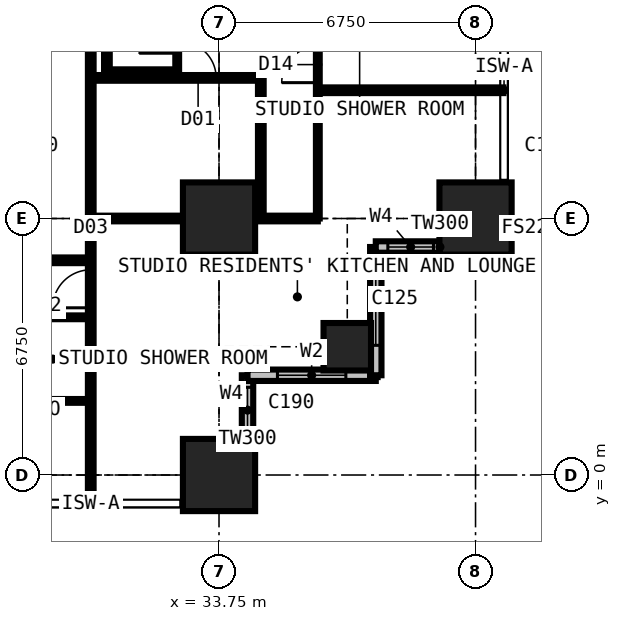
"""IFC4 building model, lengths in metres.
Left out: names, types, materials, properties, quantities, classifications, styles, units other than length and angle.
Written with IfcOpenShell. Run it as: python <this file> out.ifc"""

import sys

from ifc_helpers import new_model, si_unit, direction, frame, frame_2d, origin, origin_2d, place, context, subcontext, project, spatial, rectangle, extrude, element, fill, save


model = new_model("IFC4")
c1 = context("Model", 3, precision=1e-05, world=origin(), true_north=direction((0.0, 1.0)))
c2 = subcontext(c1, "Body", "Model", "MODEL_VIEW")
j1 = project(units=[si_unit("LENGTHUNIT", "METRE"), si_unit("PLANEANGLEUNIT", "RADIAN")], contexts=[c1])
p1 = place(None, origin())
s1 = spatial("IfcSite", under=j1, at=p1, CompositionType="ELEMENT")
p2 = place(p1, origin())
s2 = spatial("IfcBuilding", under=s1, at=p2, CompositionType="ELEMENT")
p3 = place(p2, frame((0.0, 0.0, 36.0)))
s3 = spatial("IfcBuildingStorey", under=s2, at=p3, CompositionType="ELEMENT", Elevation=36.0)
for number, where, z_axis, x_axis in (
    (1, (33.75, 0.0, 0.0), (0.0, 0.0, 1.0), (1.0, 0.0, 0.0)),
    (2, (33.75, 6.75, 0.0), (0.0, 0.0, 1.0), (1.0, 0.0, 0.0)),
):
    element("IfcColumn", number, at=place(p3, frame(where, z_axis=z_axis, x_axis=x_axis)), inside=s3, PredefinedType="COLUMN", context=c2, shape_type="SweptSolid", body=[
        extrude(rectangle(XDim=1.9, YDim=1.9, at=origin_2d()), origin(), (0.0, 0.0, 1.0), 3.6),
    ])
p4 = place(p3, frame((37.125, 3.375, 0.0), z_axis=(0.0, 0.0, 1.0), x_axis=(1.0, 0.0, 0.0)))
e3 = element("IfcColumn", 3, at=p4, inside=s3, PredefinedType="COLUMN", context=c2, shape_type="SweptSolid", body=[
    extrude(rectangle(XDim=1.25, YDim=1.25, at=origin_2d()), origin(), (0.0, 0.0, 1.0), 3.6),
])
p5 = place(p3, frame((40.5, 6.75, 0.0), z_axis=(0.0, 0.0, 1.0), x_axis=(1.0, 0.0, 0.0)))
e4 = element("IfcColumn", 4, at=p5, inside=s3, PredefinedType="COLUMN", context=c2, shape_type="SweptSolid", body=[
    extrude(rectangle(XDim=1.9, YDim=1.9, at=origin_2d()), origin(), (0.0, 0.0, 1.0), 3.6),
])
p6 = place(p3, frame((34.5, -0.75, 0.0), z_axis=(0.0, 0.0, 1.0), x_axis=(0.0, 1.0, 0.0)))
e5 = element("IfcWall", 5, at=p6, inside=s3, PredefinedType="SOLIDWALL", context=c2, shape_type="SweptSolid", body=[
    extrude(rectangle(XDim=3.375, YDim=0.3, at=frame_2d((1.688, 0.0))), origin(), (0.0, 0.0, 1.0), 3.375),
])
p7 = place(p6, frame((1.857, 0.0, 0.9)))
e6 = element("IfcOpeningElement", 6, at=p7, cuts=e5, PredefinedType="OPENING", context=c2, shape_type="SweptSolid", body=[
    extrude(rectangle(XDim=1.2, YDim=1.8, at=frame_2d((0.6, 0.9))), frame((0.0, 0.16, 0.0), z_axis=(0.0, -1.0, 0.0), x_axis=(1.0, 0.0, 0.0)), (0.0, 0.0, 1.0), 0.32),
])
p8 = place(p3, frame((34.5, 2.625, 0.0), z_axis=(0.0, 0.0, 1.0), x_axis=(1.0, 0.0, 0.0)))
e7 = element("IfcWall", 7, at=p8, inside=s3, PredefinedType="SOLIDWALL", context=c2, shape_type="SweptSolid", body=[
    extrude(rectangle(XDim=3.375, YDim=0.3, at=frame_2d((1.688, 0.0))), origin(), (0.0, 0.0, 1.0), 3.375),
])
p9 = place(p8, frame((0.788, 0.0, 0.6)))
e8 = element("IfcOpeningElement", 8, at=p9, cuts=e7, PredefinedType="OPENING", context=c2, shape_type="SweptSolid", body=[
    extrude(rectangle(XDim=1.8, YDim=2.1, at=frame_2d((0.9, 1.05))), frame((0.0, 0.16, 0.0), z_axis=(0.0, -1.0, 0.0), x_axis=(1.0, 0.0, 0.0)), (0.0, 0.0, 1.0), 0.32),
])
p10 = place(p3, frame((37.875, 2.625, 0.0), z_axis=(0.0, 0.0, 1.0), x_axis=(0.0, 1.0, 0.0)))
e9 = element("IfcWall", 9, at=p10, inside=s3, PredefinedType="SOLIDWALL", context=c2, shape_type="SweptSolid", body=[
    extrude(rectangle(XDim=3.375, YDim=0.3, at=frame_2d((1.688, 0.0))), origin(), (0.0, 0.0, 1.0), 3.375),
])
p11 = place(p10, frame((0.788, 0.0, 0.6)))
e10 = element("IfcOpeningElement", 10, at=p11, cuts=e9, PredefinedType="OPENING", context=c2, shape_type="SweptSolid", body=[
    extrude(rectangle(XDim=1.8, YDim=2.1, at=frame_2d((0.9, 1.05))), frame((0.0, 0.16, 0.0), z_axis=(0.0, -1.0, 0.0), x_axis=(1.0, 0.0, 0.0)), (0.0, 0.0, 1.0), 0.32),
])
p12 = place(p3, frame((37.875, 6.0, 0.0), z_axis=(0.0, 0.0, 1.0), x_axis=(1.0, 0.0, 0.0)))
e11 = element("IfcWall", 11, at=p12, inside=s3, PredefinedType="SOLIDWALL", context=c2, shape_type="SweptSolid", body=[
    extrude(rectangle(XDim=3.375, YDim=0.3, at=frame_2d((1.688, 0.0))), origin(), (0.0, 0.0, 1.0), 3.375),
])
p13 = place(p12, frame((0.317, 0.0, 0.9)))
e12 = element("IfcOpeningElement", 12, at=p13, cuts=e11, PredefinedType="OPENING", context=c2, shape_type="SweptSolid", body=[
    extrude(rectangle(XDim=1.2, YDim=1.8, at=frame_2d((0.6, 0.9))), frame((0.0, 0.16, 0.0), z_axis=(0.0, -1.0, 0.0), x_axis=(1.0, 0.0, 0.0)), (0.0, 0.0, 1.0), 0.32),
])
p14 = place(p3, frame((6.75, 4.15, 0.0), z_axis=(0.0, 0.0, 1.0), x_axis=(1.0, 0.0, 0.0)))
e13 = element("IfcWall", 13, at=p14, inside=s3, PredefinedType="PARTITIONING", context=c2, shape_type="SweptSolid", body=[
    extrude(rectangle(XDim=23.625, YDim=0.1, at=frame_2d((11.812, 0.0))), origin(), (0.0, 0.0, 1.0), 3.375),
])
p15 = place(p14, frame((0.2, 0.0, 0.0)))
e14 = element("IfcOpeningElement", 14, at=p15, cuts=e13, PredefinedType="OPENING", context=c2, shape_type="SweptSolid", body=[
    extrude(rectangle(XDim=0.95, YDim=2.2, at=frame_2d((0.475, 1.1))), frame((0.0, 0.06, 0.0), z_axis=(0.0, -1.0, 0.0), x_axis=(1.0, 0.0, 0.0)), (0.0, 0.0, 1.0), 0.12),
])
p16 = place(p14, frame((3.625, 0.0, 0.0)))
e15 = element("IfcOpeningElement", 15, at=p16, cuts=e13, PredefinedType="OPENING", context=c2, shape_type="SweptSolid", body=[
    extrude(rectangle(XDim=0.95, YDim=2.2, at=frame_2d((0.475, 1.1))), frame((0.0, 0.06, 0.0), z_axis=(0.0, -1.0, 0.0), x_axis=(1.0, 0.0, 0.0)), (0.0, 0.0, 1.0), 0.12),
])
p17 = place(p14, frame((7.0, 0.0, 0.0)))
e16 = element("IfcOpeningElement", 16, at=p17, cuts=e13, PredefinedType="OPENING", context=c2, shape_type="SweptSolid", body=[
    extrude(rectangle(XDim=0.95, YDim=2.2, at=frame_2d((0.475, 1.1))), frame((0.0, 0.06, 0.0), z_axis=(0.0, -1.0, 0.0), x_axis=(1.0, 0.0, 0.0)), (0.0, 0.0, 1.0), 0.12),
])
p18 = place(p14, frame((10.325, 0.0, 0.0)))
e17 = element("IfcOpeningElement", 17, at=p18, cuts=e13, PredefinedType="OPENING", context=c2, shape_type="SweptSolid", body=[
    extrude(rectangle(XDim=0.95, YDim=2.2, at=frame_2d((0.475, 1.1))), frame((0.0, 0.06, 0.0), z_axis=(0.0, -1.0, 0.0), x_axis=(1.0, 0.0, 0.0)), (0.0, 0.0, 1.0), 0.12),
])
p19 = place(p14, frame((13.75, 0.0, 0.0)))
e18 = element("IfcOpeningElement", 18, at=p19, cuts=e13, PredefinedType="OPENING", context=c2, shape_type="SweptSolid", body=[
    extrude(rectangle(XDim=0.95, YDim=2.2, at=frame_2d((0.475, 1.1))), frame((0.0, 0.06, 0.0), z_axis=(0.0, -1.0, 0.0), x_axis=(1.0, 0.0, 0.0)), (0.0, 0.0, 1.0), 0.12),
])
p20 = place(p14, frame((17.125, 0.0, 0.0)))
e19 = element("IfcOpeningElement", 19, at=p20, cuts=e13, PredefinedType="OPENING", context=c2, shape_type="SweptSolid", body=[
    extrude(rectangle(XDim=0.95, YDim=2.2, at=frame_2d((0.475, 1.1))), frame((0.0, 0.06, 0.0), z_axis=(0.0, -1.0, 0.0), x_axis=(1.0, 0.0, 0.0)), (0.0, 0.0, 1.0), 0.12),
])
p21 = place(p14, frame((20.5, 0.0, 0.0)))
e20 = element("IfcOpeningElement", 20, at=p21, cuts=e13, PredefinedType="OPENING", context=c2, shape_type="SweptSolid", body=[
    extrude(rectangle(XDim=0.95, YDim=2.2, at=frame_2d((0.475, 1.1))), frame((0.0, 0.06, 0.0), z_axis=(0.0, -1.0, 0.0), x_axis=(1.0, 0.0, 0.0)), (0.0, 0.0, 1.0), 0.12),
])
p22 = place(p3, frame((22.988, 5.65, 0.0), z_axis=(0.0, 0.0, 1.0), x_axis=(1.0, 0.0, 0.0)))
e21 = element("IfcWall", 21, at=p22, inside=s3, PredefinedType="PARTITIONING", context=c2, shape_type="SweptSolid", body=[
    extrude(rectangle(XDim=7.387, YDim=0.15, at=frame_2d((3.694, 0.0))), origin(), (0.0, 0.0, 1.0), 3.375),
])
p23 = place(p22, frame((2.1, 0.0, 0.0)))
e22 = element("IfcOpeningElement", 22, at=p23, cuts=e21, PredefinedType="OPENING", context=c2, shape_type="SweptSolid", body=[
    extrude(rectangle(XDim=0.95, YDim=2.2, at=frame_2d((0.475, 1.1))), frame((0.0, 0.085, 0.0), z_axis=(0.0, -1.0, 0.0), x_axis=(1.0, 0.0, 0.0)), (0.0, 0.0, 1.0), 0.17),
])
p24 = place(p3, frame((28.375, 1.95, 0.0), z_axis=(0.0, 0.0, 1.0), x_axis=(1.0, 0.0, 0.0)))
e23 = element("IfcWall", 23, at=p24, inside=s3, PredefinedType="PARTITIONING", context=c2, shape_type="SweptSolid", body=[
    extrude(rectangle(XDim=2.0, YDim=0.1, at=frame_2d((1.0, 0.0))), origin(), (0.0, 0.0, 1.0), 3.375),
])
p25 = place(p3, frame((30.375, -0.734, 0.0), z_axis=(0.0, 0.0, 1.0), x_axis=(0.0, 1.0, 0.0)))
e24 = element("IfcWall", 24, at=p25, inside=s3, PredefinedType="PARTITIONING", context=c2, shape_type="SweptSolid", body=[
    extrude(rectangle(XDim=12.034, YDim=0.15, at=frame_2d((6.017, 0.0))), origin(), (0.0, 0.0, 1.0), 3.375),
])
p26 = place(p25, frame((5.134, 0.0, 0.0)))
e25 = element("IfcOpeningElement", 25, at=p26, cuts=e24, PredefinedType="OPENING", context=c2, shape_type="SweptSolid", body=[
    extrude(rectangle(XDim=1.0, YDim=2.2, at=frame_2d((0.5, 1.1))), frame((0.0, 0.085, 0.0), z_axis=(0.0, -1.0, 0.0), x_axis=(1.0, 0.0, 0.0)), (0.0, 0.0, 1.0), 0.17),
])
p27 = place(p3, frame((30.375, 6.75, 0.0), z_axis=(0.0, 0.0, 1.0), x_axis=(1.0, 0.0, 0.0)))
e26 = element("IfcWall", 26, at=p27, inside=s3, PredefinedType="PARTITIONING", context=c2, shape_type="SweptSolid", body=[
    extrude(rectangle(XDim=5.975, YDim=0.15, at=frame_2d((2.988, 0.0))), origin(), (0.0, 0.0, 1.0), 2.877),
])
p28 = place(p3, frame((30.375, 10.45, 0.0), z_axis=(0.0, 0.0, 1.0), x_axis=(1.0, 0.0, 0.0)))
e27 = element("IfcWall", 27, at=p28, inside=s3, PredefinedType="PARTITIONING", context=c2, shape_type="SweptSolid", body=[
    extrude(rectangle(XDim=4.475, YDim=0.15, at=frame_2d((2.238, 0.0))), origin(), (0.0, 0.0, 1.0), 3.375),
])
p29 = place(p28, frame((2.35, 0.0, 0.0)))
e28 = element("IfcOpeningElement", 28, at=p29, cuts=e27, PredefinedType="OPENING", context=c2, shape_type="SweptSolid", body=[
    extrude(rectangle(XDim=0.95, YDim=2.2, at=frame_2d((0.475, 1.1))), frame((0.0, 0.085, 0.0), z_axis=(0.0, -1.0, 0.0), x_axis=(1.0, 0.0, 0.0)), (0.0, 0.0, 1.0), 0.17),
])
p30 = place(p3, frame((30.8, 10.6, 0.0), z_axis=(0.0, 0.0, 1.0), x_axis=(0.0, 1.0, 0.0)))
e29 = element("IfcWall", 29, at=p30, inside=s3, PredefinedType="PARTITIONING", context=c2, shape_type="SweptSolid", body=[
    extrude(rectangle(XDim=0.7, YDim=0.15, at=frame_2d((0.35, 0.0))), origin(), (0.0, 0.0, 1.0), 3.375),
])
p31 = place(p3, frame((30.8, 10.6, 0.0), z_axis=(0.0, 0.0, 1.0), x_axis=(1.0, 0.0, 0.0)))
e30 = element("IfcWall", 30, at=p31, inside=s3, PredefinedType="PARTITIONING", context=c2, shape_type="SweptSolid", body=[
    extrude(rectangle(XDim=1.85, YDim=0.15, at=frame_2d((0.925, 0.0))), origin(), (0.0, 0.0, 1.0), 3.375),
])
p32 = place(p3, frame((32.65, 10.6, 0.0), z_axis=(0.0, 0.0, 1.0), x_axis=(0.0, 1.0, 0.0)))
e31 = element("IfcWall", 31, at=p32, inside=s3, PredefinedType="SHEAR", context=c2, shape_type="SweptSolid", body=[
    extrude(rectangle(XDim=9.3, YDim=0.1, at=frame_2d((4.65, 0.0))), origin(), (0.0, 0.0, 1.0), 3.375),
])
p33 = place(p32, frame((0.5, 0.0, 0.0)))
e32 = element("IfcOpeningElement", 32, at=p33, cuts=e31, PredefinedType="OPENING", context=c2, shape_type="SweptSolid", body=[
    extrude(rectangle(XDim=1.0, YDim=2.2, at=frame_2d((0.5, 1.1))), frame((0.0, 0.06, 0.0), z_axis=(0.0, -1.0, 0.0), x_axis=(1.0, 0.0, 0.0)), (0.0, 0.0, 1.0), 0.12),
])
p34 = place(p3, frame((34.85, 6.75, 0.0), z_axis=(0.0, 0.0, 1.0), x_axis=(0.0, 1.0, 0.0)))
e33 = element("IfcWall", 33, at=p34, inside=s3, PredefinedType="PARTITIONING", context=c2, shape_type="SweptSolid", body=[
    extrude(rectangle(XDim=3.7, YDim=0.15, at=frame_2d((1.85, 0.0))), origin(), (0.0, 0.0, 1.0), 3.375),
])
p35 = place(p3, frame((36.35, 6.75, 0.0), z_axis=(0.0, 0.0, 1.0), x_axis=(0.0, 1.0, 0.0)))
e34 = element("IfcWall", 34, at=p35, inside=s3, PredefinedType="PARTITIONING", context=c2, shape_type="SweptSolid", body=[
    extrude(rectangle(XDim=23.625, YDim=0.1, at=frame_2d((11.812, 0.0))), origin(), (0.0, 0.0, 1.0), 3.375),
])
p36 = place(p35, frame((3.575, 0.0, 0.0)))
e35 = element("IfcOpeningElement", 35, at=p36, cuts=e34, PredefinedType="OPENING", context=c2, shape_type="SweptSolid", body=[
    extrude(rectangle(XDim=0.95, YDim=2.2, at=frame_2d((0.475, 1.1))), frame((0.0, 0.06, 0.0), z_axis=(0.0, -1.0, 0.0), x_axis=(1.0, 0.0, 0.0)), (0.0, 0.0, 1.0), 0.12),
])
p37 = place(p35, frame((7.0, 0.0, 0.0)))
e36 = element("IfcOpeningElement", 36, at=p37, cuts=e34, PredefinedType="OPENING", context=c2, shape_type="SweptSolid", body=[
    extrude(rectangle(XDim=0.95, YDim=2.2, at=frame_2d((0.475, 1.1))), frame((0.0, 0.06, 0.0), z_axis=(0.0, -1.0, 0.0), x_axis=(1.0, 0.0, 0.0)), (0.0, 0.0, 1.0), 0.12),
])
p38 = place(p35, frame((10.375, 0.0, 0.0)))
e37 = element("IfcOpeningElement", 37, at=p38, cuts=e34, PredefinedType="OPENING", context=c2, shape_type="SweptSolid", body=[
    extrude(rectangle(XDim=0.95, YDim=2.2, at=frame_2d((0.475, 1.1))), frame((0.0, 0.06, 0.0), z_axis=(0.0, -1.0, 0.0), x_axis=(1.0, 0.0, 0.0)), (0.0, 0.0, 1.0), 0.12),
])
p39 = place(p35, frame((13.75, 0.0, 0.0)))
e38 = element("IfcOpeningElement", 38, at=p39, cuts=e34, PredefinedType="OPENING", context=c2, shape_type="SweptSolid", body=[
    extrude(rectangle(XDim=0.95, YDim=2.2, at=frame_2d((0.475, 1.1))), frame((0.0, 0.06, 0.0), z_axis=(0.0, -1.0, 0.0), x_axis=(1.0, 0.0, 0.0)), (0.0, 0.0, 1.0), 0.12),
])
p40 = place(p35, frame((17.125, 0.0, 0.0)))
e39 = element("IfcOpeningElement", 39, at=p40, cuts=e34, PredefinedType="OPENING", context=c2, shape_type="SweptSolid", body=[
    extrude(rectangle(XDim=0.95, YDim=2.2, at=frame_2d((0.475, 1.1))), frame((0.0, 0.06, 0.0), z_axis=(0.0, -1.0, 0.0), x_axis=(1.0, 0.0, 0.0)), (0.0, 0.0, 1.0), 0.12),
])
p41 = place(p35, frame((20.5, 0.0, 0.0)))
e40 = element("IfcOpeningElement", 40, at=p41, cuts=e34, PredefinedType="OPENING", context=c2, shape_type="SweptSolid", body=[
    extrude(rectangle(XDim=0.95, YDim=2.2, at=frame_2d((0.475, 1.1))), frame((0.0, 0.06, 0.0), z_axis=(0.0, -1.0, 0.0), x_axis=(1.0, 0.0, 0.0)), (0.0, 0.0, 1.0), 0.12),
])
p42 = place(p3, frame((36.35, 10.125, 0.0), z_axis=(0.0, 0.0, 1.0), x_axis=(1.0, 0.0, 0.0)))
e41 = element("IfcWall", 41, at=p42, inside=s3, PredefinedType="PARTITIONING", context=c2, shape_type="SweptSolid", body=[
    extrude(rectangle(XDim=4.884, YDim=0.15, at=frame_2d((2.442, 0.0))), origin(), (0.0, 0.0, 1.0), 3.375),
])
p43 = place(p7, origin())
e42 = element("IfcWindow", 42, at=p43, inside=s3, PartitioningType="SINGLE_PANEL", PredefinedType="WINDOW", context=c2, shape_type="SweptSolid", body=[
    extrude(rectangle(XDim=1.2, YDim=1.8, at=frame_2d((0.6, 0.9))), frame((0.0, 0.03, 0.0), z_axis=(0.0, -1.0, 0.0), x_axis=(1.0, 0.0, 0.0)), (0.0, 0.0, 1.0), 0.06),
])
fill(e6, e42)
p44 = place(p9, origin())
e43 = element("IfcWindow", 43, at=p44, inside=s3, PartitioningType="SINGLE_PANEL", PredefinedType="WINDOW", context=c2, shape_type="SweptSolid", body=[
    extrude(rectangle(XDim=1.8, YDim=2.1, at=frame_2d((0.9, 1.05))), frame((0.0, 0.03, 0.0), z_axis=(0.0, -1.0, 0.0), x_axis=(1.0, 0.0, 0.0)), (0.0, 0.0, 1.0), 0.06),
])
fill(e8, e43)
p45 = place(p11, origin())
e44 = element("IfcWindow", 44, at=p45, inside=s3, PartitioningType="SINGLE_PANEL", PredefinedType="WINDOW", context=c2, shape_type="SweptSolid", body=[
    extrude(rectangle(XDim=1.8, YDim=2.1, at=frame_2d((0.9, 1.05))), frame((0.0, 0.03, 0.0), z_axis=(0.0, -1.0, 0.0), x_axis=(1.0, 0.0, 0.0)), (0.0, 0.0, 1.0), 0.06),
])
fill(e10, e44)
p46 = place(p13, origin())
e45 = element("IfcWindow", 45, at=p46, inside=s3, PartitioningType="SINGLE_PANEL", PredefinedType="WINDOW", context=c2, shape_type="SweptSolid", body=[
    extrude(rectangle(XDim=1.2, YDim=1.8, at=frame_2d((0.6, 0.9))), frame((0.0, 0.03, 0.0), z_axis=(0.0, -1.0, 0.0), x_axis=(1.0, 0.0, 0.0)), (0.0, 0.0, 1.0), 0.06),
])
fill(e12, e45)
p47 = place(p26, origin())
e46 = element("IfcDoor", 46, at=p47, inside=s3, OperationType="SINGLE_SWING_LEFT", PredefinedType="DOOR", context=c2, shape_type="SweptSolid", body=[
    extrude(rectangle(XDim=1.0, YDim=2.2, at=frame_2d((0.5, 1.1))), frame((0.0, 0.025, 0.0), z_axis=(0.0, -1.0, 0.0), x_axis=(1.0, 0.0, 0.0)), (0.0, 0.0, 1.0), 0.05),
])
fill(e25, e46)
p48 = place(p36, origin())
e47 = element("IfcDoor", 47, at=p48, inside=s3, OperationType="SINGLE_SWING_LEFT", PredefinedType="DOOR", context=c2, shape_type="SweptSolid", body=[
    extrude(rectangle(XDim=0.95, YDim=2.2, at=frame_2d((0.475, 1.1))), frame((0.0, 0.025, 0.0), z_axis=(0.0, -1.0, 0.0), x_axis=(1.0, 0.0, 0.0)), (0.0, 0.0, 1.0), 0.05),
])
fill(e35, e47)
p49 = place(p33, origin())
e48 = element("IfcDoor", 48, at=p49, inside=s3, OperationType="SINGLE_SWING_LEFT", PredefinedType="DOOR", context=c2, shape_type="SweptSolid", body=[
    extrude(rectangle(XDim=1.0, YDim=2.2, at=frame_2d((0.5, 1.1))), frame((0.0, 0.025, 0.0), z_axis=(0.0, -1.0, 0.0), x_axis=(1.0, 0.0, 0.0)), (0.0, 0.0, 1.0), 0.05),
])
fill(e32, e48)
p50 = place(p29, origin())
e49 = element("IfcDoor", 49, at=p50, inside=s3, OperationType="SINGLE_SWING_LEFT", PredefinedType="DOOR", context=c2, shape_type="SweptSolid", body=[
    extrude(rectangle(XDim=0.95, YDim=2.2, at=frame_2d((0.475, 1.1))), frame((0.0, 0.025, 0.0), z_axis=(0.0, -1.0, 0.0), x_axis=(1.0, 0.0, 0.0)), (0.0, 0.0, 1.0), 0.05),
])
fill(e28, e49)
save(model, sys.argv[1])
